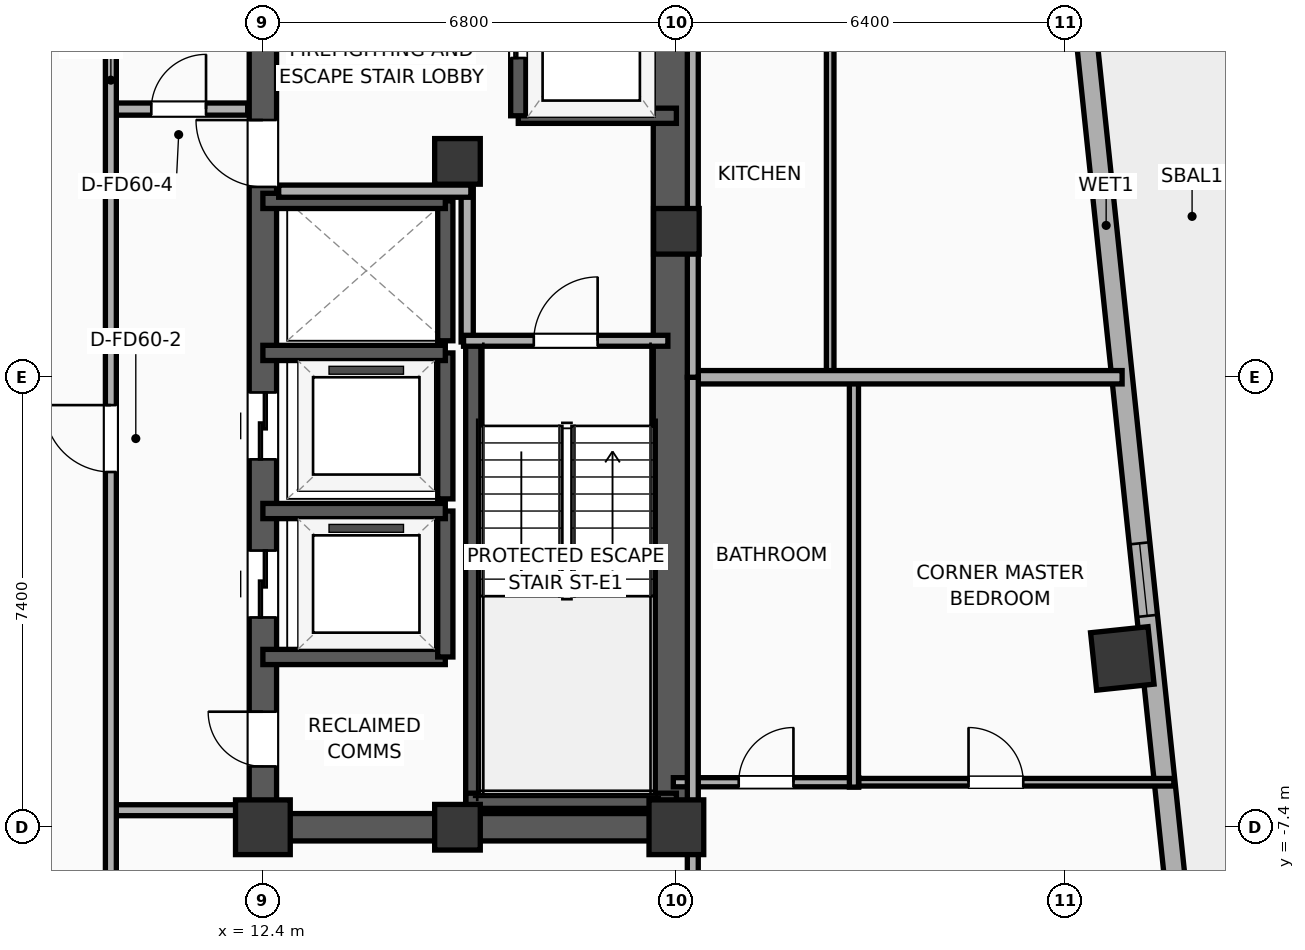
"""IFC4 building model, lengths in metres.
Left out: names, types, materials, properties, quantities, classifications, styles, units other than length and angle.
Written with IfcOpenShell. Run it as: python <this file> out.ifc"""

import sys

from ifc_helpers import new_model, si_unit, direction, frame, frame_2d, origin, origin_2d, place, context, subcontext, project, spatial, rectangle, hollow_rectangle, extrude, element, fill, save


model = new_model("IFC4")
c1 = context("Model", 3, precision=1e-05, world=origin(), true_north=direction((0.0, 1.0)))
c2 = subcontext(c1, "Body", "Model", "MODEL_VIEW")
j1 = project(units=[si_unit("LENGTHUNIT", "METRE"), si_unit("PLANEANGLEUNIT", "RADIAN")], contexts=[c1])
p1 = place(None, origin())
s1 = spatial("IfcSite", under=j1, at=p1, CompositionType="ELEMENT")
p2 = place(p1, origin())
s2 = spatial("IfcBuilding", under=s1, at=p2, CompositionType="ELEMENT")
p3 = place(p2, frame((0.0, 0.0, 171.6)))
s3 = spatial("IfcBuildingStorey", under=s2, at=p3, CompositionType="ELEMENT", Elevation=171.6)
p4 = place(p3, frame((12.4, -7.4, 0.0), z_axis=(0.0, 0.0, 1.0), x_axis=(1.0, 0.0, 0.0)))
e1 = element("IfcColumn", 1, at=p4, inside=s3, PredefinedType="COLUMN", context=c2, shape_type="SweptSolid", body=[
    extrude(rectangle(XDim=0.9, YDim=0.9, at=origin_2d()), origin(), (0.0, 0.0, 1.0), 3.9),
])
for number, where, z_axis, x_axis in (
    (2, (15.6, 3.55, 0.0), (0.0, 0.0, 1.0), (1.0, 0.0, 0.0)),
    (3, (15.6, -7.4, 0.0), (0.0, 0.0, 1.0), (1.0, 0.0, 0.0)),
):
    element("IfcColumn", number, at=place(p3, frame(where, z_axis=z_axis, x_axis=x_axis)), inside=s3, PredefinedType="COLUMN", context=c2, shape_type="SweptSolid", body=[
        extrude(rectangle(XDim=0.75, YDim=0.75, at=origin_2d()), origin(), (0.0, 0.0, 1.0), 3.9),
    ])
p5 = place(p3, frame((19.2, -7.4, 0.0), z_axis=(0.0, 0.0, 1.0), x_axis=(1.0, 0.0, 0.0)))
e4 = element("IfcColumn", 4, at=p5, inside=s3, PredefinedType="COLUMN", context=c2, shape_type="SweptSolid", body=[
    extrude(rectangle(XDim=0.9, YDim=0.9, at=origin_2d()), origin(), (0.0, 0.0, 1.0), 3.9),
])
p6 = place(p3, frame((19.2, 2.4, 0.0), z_axis=(0.0, 0.0, 1.0), x_axis=(1.0, 0.0, 0.0)))
e5 = element("IfcColumn", 5, at=p6, inside=s3, PredefinedType="COLUMN", context=c2, shape_type="SweptSolid", body=[
    extrude(rectangle(XDim=0.75, YDim=0.75, at=origin_2d()), origin(), (0.0, 0.0, 1.0), 3.9),
])
p7 = place(p3, frame((12.175, -7.4, 0.0), z_axis=(0.0, 0.0, 1.0), x_axis=(1.0, 0.0, 0.0)))
e6 = element("IfcWall", 6, at=p7, inside=s3, PredefinedType="SHEAR", context=c2, shape_type="SweptSolid", body=[
    extrude(rectangle(XDim=7.25, YDim=0.45, at=frame_2d((3.625, 0.0))), origin(), (0.0, 0.0, 1.0), 3.65),
])
p8 = place(p3, frame((12.4, -7.4, 0.0), z_axis=(0.0, 0.0, 1.0), x_axis=(0.0, 1.0, 0.0)))
e7 = element("IfcWall", 7, at=p8, inside=s3, PredefinedType="SHEAR", context=c2, shape_type="SweptSolid", body=[
    extrude(rectangle(XDim=14.8, YDim=0.45, at=frame_2d((7.4, 0.0))), origin(), (0.0, 0.0, 1.0), 3.65),
])
p9 = place(p8, frame((3.45, 0.0, 0.0)))
e8 = element("IfcOpeningElement", 8, at=p9, cuts=e7, PredefinedType="OPENING", context=c2, shape_type="SweptSolid", body=[
    extrude(rectangle(XDim=1.1, YDim=2.05, at=frame_2d((0.55, 1.025))), frame((0.0, 0.235, 0.0), z_axis=(0.0, -1.0, 0.0), x_axis=(1.0, 0.0, 0.0)), (0.0, 0.0, 1.0), 0.47),
])
p10 = place(p8, frame((6.05, 0.0, 0.0)))
e9 = element("IfcOpeningElement", 9, at=p10, cuts=e7, PredefinedType="OPENING", context=c2, shape_type="SweptSolid", body=[
    extrude(rectangle(XDim=1.1, YDim=2.05, at=frame_2d((0.55, 1.025))), frame((0.0, 0.235, 0.0), z_axis=(0.0, -1.0, 0.0), x_axis=(1.0, 0.0, 0.0)), (0.0, 0.0, 1.0), 0.47),
])
p11 = place(p8, frame((10.53, 0.0, 0.0)))
e10 = element("IfcOpeningElement", 10, at=p11, cuts=e7, PredefinedType="OPENING", context=c2, shape_type="SweptSolid", body=[
    extrude(rectangle(XDim=1.1, YDim=2.05, at=frame_2d((0.55, 1.025))), frame((0.0, 0.235, 0.0), z_axis=(0.0, -1.0, 0.0), x_axis=(1.0, 0.0, 0.0)), (0.0, 0.0, 1.0), 0.47),
])
p12 = place(p8, frame((1.0, 0.0, 0.0)))
e11 = element("IfcOpeningElement", 11, at=p12, cuts=e7, PredefinedType="OPENING", context=c2, shape_type="SweptSolid", body=[
    extrude(rectangle(XDim=0.9, YDim=2.05, at=frame_2d((0.45, 1.025))), frame((0.0, 0.235, 0.0), z_axis=(0.0, -1.0, 0.0), x_axis=(1.0, 0.0, 0.0)), (0.0, 0.0, 1.0), 0.47),
])
p13 = place(p3, frame((19.145, -7.4, 0.0), z_axis=(0.0, 0.0, 1.0), x_axis=(0.0, 1.0, 0.0)))
e12 = element("IfcWall", 12, at=p13, inside=s3, PredefinedType="SHEAR", context=c2, shape_type="SweptSolid", body=[
    extrude(rectangle(XDim=14.8, YDim=0.65, at=frame_2d((7.4, 0.0))), origin(), (0.0, 0.0, 1.0), 3.65),
])
p14 = place(p3, frame((15.86, -7.085, 0.0), z_axis=(0.0, 0.0, 1.0), x_axis=(0.0, 1.0, 0.0)))
e13 = element("IfcWall", 13, at=p14, inside=s3, PredefinedType="SOLIDWALL", context=c2, shape_type="SweptSolid", body=[
    extrude(rectangle(XDim=7.685, YDim=0.25, at=frame_2d((3.843, 0.0))), origin(), (0.0, 0.0, 1.0), 3.65),
])
p15 = place(p3, frame((15.74, -6.965, 0.0), z_axis=(0.0, 0.0, 1.0), x_axis=(1.0, 0.0, 0.0)))
e14 = element("IfcWall", 14, at=p15, inside=s3, PredefinedType="SOLIDWALL", context=c2, shape_type="SweptSolid", body=[
    extrude(rectangle(XDim=3.46, YDim=0.25, at=frame_2d((1.73, 0.0))), origin(), (0.0, 0.0, 1.0), 3.65),
])
p16 = place(p3, frame((26.533, -4.624, 0.0), z_axis=(0.0, 0.0, 1.0), x_axis=(0.994521895368, 0.104528463268, 0.0)))
e15 = element("IfcColumn", 15, at=p16, inside=s3, PredefinedType="COLUMN", context=c2, shape_type="SweptSolid", body=[
    extrude(hollow_rectangle(XDim=0.95, YDim=0.95, WallThickness=0.032, at=origin_2d()), origin(), (0.0, 0.0, 1.0), 3.9),
])
p17 = place(p3, frame((24.534, 18.99, 0.0), z_axis=(0.0, 0.0, 1.0), x_axis=(0.104534959766, -0.994521212537, 0.0)))
e16 = element("IfcWall", 16, at=p17, inside=s3, PredefinedType="ELEMENTEDWALL", context=c2, shape_type="SweptSolid", body=[
    extrude(rectangle(XDim=33.166, YDim=0.34, at=frame_2d((16.583, 0.0))), origin(), (0.0, 0.0, 1.0), 3.65),
])
p18 = place(p17, frame((6.542, 0.0, 0.75)))
e17 = element("IfcOpeningElement", 17, at=p18, cuts=e16, PredefinedType="OPENING", context=c2, shape_type="SweptSolid", body=[
    extrude(rectangle(XDim=1.8, YDim=2.1, at=frame_2d((0.9, 1.05))), frame((0.0, 0.18, 0.0), z_axis=(0.0, -1.0, 0.0), x_axis=(1.0, 0.0, 0.0)), (0.0, 0.0, 1.0), 0.36),
])
p19 = place(p17, frame((21.84, 0.0, 0.75)))
e18 = element("IfcOpeningElement", 18, at=p19, cuts=e16, PredefinedType="OPENING", context=c2, shape_type="SweptSolid", body=[
    extrude(rectangle(XDim=1.2, YDim=2.05, at=frame_2d((0.6, 1.025))), frame((0.0, 0.18, 0.0), z_axis=(0.0, -1.0, 0.0), x_axis=(1.0, 0.0, 0.0)), (0.0, 0.0, 1.0), 0.36),
])
p20 = place(p3, frame((16.6, 4.3, 0.0), z_axis=(0.0, 0.0, 1.0), x_axis=(1.0, 0.0, 0.0)))
e19 = element("IfcWall", 19, at=p20, inside=s3, PredefinedType="SOLIDWALL", context=c2, shape_type="SweptSolid", body=[
    extrude(rectangle(XDim=2.6, YDim=0.25, at=frame_2d((1.3, 0.0))), origin(), (0.0, 0.0, 1.0), 3.65),
])
p21 = place(p3, frame((16.6, 7.4, 0.0), z_axis=(0.0, 0.0, 1.0), x_axis=(0.0, -1.0, 0.0)))
e20 = element("IfcWall", 20, at=p21, inside=s3, PredefinedType="SOLIDWALL", context=c2, shape_type="SweptSolid", body=[
    extrude(rectangle(XDim=3.1, YDim=0.25, at=frame_2d((1.55, 0.0))), origin(), (0.0, 0.0, 1.0), 3.65),
])
p22 = place(p21, frame((0.95, 0.0, 0.0)))
e21 = element("IfcOpeningElement", 21, at=p22, cuts=e20, PredefinedType="OPENING", context=c2, shape_type="SweptSolid", body=[
    extrude(rectangle(XDim=1.2, YDim=2.05, at=frame_2d((0.6, 1.025))), frame((0.0, 0.135, 0.0), z_axis=(0.0, -1.0, 0.0), x_axis=(1.0, 0.0, 0.0)), (0.0, 0.0, 1.0), 0.27),
])
p23 = place(p3, frame((12.4, -4.6, 0.0), z_axis=(0.0, 0.0, 1.0), x_axis=(1.0, 0.0, 0.0)))
e22 = element("IfcWall", 22, at=p23, inside=s3, PredefinedType="SOLIDWALL", context=c2, shape_type="SweptSolid", body=[
    extrude(rectangle(XDim=3.0, YDim=0.25, at=frame_2d((1.5, 0.0))), origin(), (0.0, 0.0, 1.0), 3.65),
])
p24 = place(p3, frame((15.4, -4.6, 0.0), z_axis=(0.0, 0.0, 1.0), x_axis=(0.0, 1.0, 0.0)))
e23 = element("IfcWall", 23, at=p24, inside=s3, PredefinedType="SOLIDWALL", context=c2, shape_type="SweptSolid", body=[
    extrude(rectangle(XDim=2.4, YDim=0.25, at=frame_2d((1.2, 0.0))), origin(), (0.0, 0.0, 1.0), 3.65),
])
p25 = place(p3, frame((15.4, -2.2, 0.0), z_axis=(0.0, 0.0, 1.0), x_axis=(-1.0, 0.0, 0.0)))
e24 = element("IfcWall", 24, at=p25, inside=s3, PredefinedType="SOLIDWALL", context=c2, shape_type="SweptSolid", body=[
    extrude(rectangle(XDim=3.0, YDim=0.25, at=frame_2d((1.5, 0.0))), origin(), (0.0, 0.0, 1.0), 3.65),
])
p26 = place(p3, frame((15.4, -2.0, 0.0), z_axis=(0.0, 0.0, 1.0), x_axis=(0.0, 1.0, 0.0)))
e25 = element("IfcWall", 25, at=p26, inside=s3, PredefinedType="SOLIDWALL", context=c2, shape_type="SweptSolid", body=[
    extrude(rectangle(XDim=2.4, YDim=0.25, at=frame_2d((1.2, 0.0))), origin(), (0.0, 0.0, 1.0), 3.65),
])
p27 = place(p3, frame((15.4, 0.4, 0.0), z_axis=(0.0, 0.0, 1.0), x_axis=(-1.0, 0.0, 0.0)))
e26 = element("IfcWall", 26, at=p27, inside=s3, PredefinedType="SOLIDWALL", context=c2, shape_type="SweptSolid", body=[
    extrude(rectangle(XDim=3.0, YDim=0.25, at=frame_2d((1.5, 0.0))), origin(), (0.0, 0.0, 1.0), 3.65),
])
p28 = place(p3, frame((15.4, 0.6, 0.0), z_axis=(0.0, 0.0, 1.0), x_axis=(0.0, 1.0, 0.0)))
e27 = element("IfcWall", 27, at=p28, inside=s3, PredefinedType="SOLIDWALL", context=c2, shape_type="SweptSolid", body=[
    extrude(rectangle(XDim=2.3, YDim=0.25, at=frame_2d((1.15, 0.0))), origin(), (0.0, 0.0, 1.0), 3.65),
])
p29 = place(p3, frame((15.4, 2.9, 0.0), z_axis=(0.0, 0.0, 1.0), x_axis=(-1.0, 0.0, 0.0)))
e28 = element("IfcWall", 28, at=p29, inside=s3, PredefinedType="SOLIDWALL", context=c2, shape_type="SweptSolid", body=[
    extrude(rectangle(XDim=3.0, YDim=0.25, at=frame_2d((1.5, 0.0))), origin(), (0.0, 0.0, 1.0), 3.65),
])
p30 = place(p3, frame((15.76, 0.58, 0.0), z_axis=(0.0, 0.0, 1.0), x_axis=(0.0, 1.0, 0.0)))
e29 = element("IfcWall", 29, at=p30, inside=s3, PredefinedType="PARTITIONING", context=c2, shape_type="SweptSolid", body=[
    extrude(rectangle(XDim=2.52, YDim=0.2, at=frame_2d((1.26, 0.0))), origin(), (0.0, 0.0, 1.0), 3.65),
])
p31 = place(p3, frame((12.66, 3.06, 0.0), z_axis=(0.0, 0.0, 1.0), x_axis=(1.0, 0.0, 0.0)))
e30 = element("IfcWall", 30, at=p31, inside=s3, PredefinedType="PARTITIONING", context=c2, shape_type="SweptSolid", body=[
    extrude(rectangle(XDim=3.16, YDim=0.2, at=frame_2d((1.58, 0.0))), origin(), (0.0, 0.0, 1.0), 3.65),
])
p32 = place(p3, frame((15.7, 0.6, 0.0), z_axis=(0.0, 0.0, 1.0), x_axis=(1.0, 0.0, 0.0)))
e31 = element("IfcWall", 31, at=p32, inside=s3, PredefinedType="PARTITIONING", context=c2, shape_type="SweptSolid", body=[
    extrude(rectangle(XDim=3.36, YDim=0.18, at=frame_2d((1.68, 0.0))), origin(), (0.0, 0.0, 1.0), 3.65),
])
p33 = place(p32, frame((1.155, 0.0, 0.0)))
e32 = element("IfcOpeningElement", 32, at=p33, cuts=e31, PredefinedType="OPENING", context=c2, shape_type="SweptSolid", body=[
    extrude(rectangle(XDim=1.05, YDim=2.05, at=frame_2d((0.525, 1.025))), frame((0.0, 0.1, 0.0), z_axis=(0.0, -1.0, 0.0), x_axis=(1.0, 0.0, 0.0)), (0.0, 0.0, 1.0), 0.2),
])
p34 = place(p3, frame((9.88, 4.41, 0.0), z_axis=(0.0, 0.0, 1.0), x_axis=(1.0, 0.0, 0.0)))
e33 = element("IfcWall", 33, at=p34, inside=s3, PredefinedType="PARTITIONING", context=c2, shape_type="SweptSolid", body=[
    extrude(rectangle(XDim=2.27, YDim=0.2, at=frame_2d((1.135, 0.0))), origin(), (0.0, 0.0, 1.0), 3.65),
])
p35 = place(p34, frame((0.685, 0.0, 0.0)))
e34 = element("IfcOpeningElement", 34, at=p35, cuts=e33, PredefinedType="OPENING", context=c2, shape_type="SweptSolid", body=[
    extrude(rectangle(XDim=0.9, YDim=2.05, at=frame_2d((0.45, 1.025))), frame((0.0, 0.11, 0.0), z_axis=(0.0, -1.0, 0.0), x_axis=(1.0, 0.0, 0.0)), (0.0, 0.0, 1.0), 0.22),
])
p36 = place(p3, frame((9.88, -7.12, 0.0), z_axis=(0.0, 0.0, 1.0), x_axis=(1.0, 0.0, 0.0)))
e35 = element("IfcWall", 35, at=p36, inside=s3, PredefinedType="PARTITIONING", context=c2, shape_type="SweptSolid", body=[
    extrude(rectangle(XDim=2.27, YDim=0.18, at=frame_2d((1.135, 0.0))), origin(), (0.0, 0.0, 1.0), 3.65),
])
p37 = place(p3, frame((9.9, -10.08, 0.0), z_axis=(0.0, 0.0, 1.0), x_axis=(0.0, 1.0, 0.0)))
e36 = element("IfcWall", 36, at=p37, inside=s3, PredefinedType="PARTITIONING", context=c2, shape_type="SweptSolid", body=[
    extrude(rectangle(XDim=20.16, YDim=0.18, at=frame_2d((10.08, 0.0))), origin(), (0.0, 0.0, 1.0), 3.65),
])
p38 = place(p37, frame((8.522, 0.0, 0.0)))
e37 = element("IfcOpeningElement", 37, at=p38, cuts=e36, PredefinedType="OPENING", context=c2, shape_type="SweptSolid", body=[
    extrude(rectangle(XDim=1.1, YDim=2.05, at=frame_2d((0.55, 1.025))), frame((0.0, 0.1, 0.0), z_axis=(0.0, -1.0, 0.0), x_axis=(1.0, 0.0, 0.0)), (0.0, 0.0, 1.0), 0.2),
])
p39 = place(p3, frame((22.06, -6.66, 0.0), z_axis=(0.0, 0.0, 1.0), x_axis=(1.0, 0.0, 0.0)))
e38 = element("IfcWall", 38, at=p39, inside=s3, PredefinedType="PARTITIONING", context=c2, shape_type="SweptSolid", body=[
    extrude(rectangle(XDim=5.321, YDim=0.125, at=frame_2d((2.661, 0.0))), origin(), (0.0, 0.0, 1.0), 3.65),
])
p40 = place(p39, frame((1.945, 0.0, 0.0)))
e39 = element("IfcOpeningElement", 39, at=p40, cuts=e38, PredefinedType="OPENING", context=c2, shape_type="SweptSolid", body=[
    extrude(rectangle(XDim=0.9, YDim=2.05, at=frame_2d((0.45, 1.025))), frame((0.0, 0.073, 0.0), z_axis=(0.0, -1.0, 0.0), x_axis=(1.0, 0.0, 0.0)), (0.0, 0.0, 1.0), 0.145),
])
p41 = place(p3, frame((19.15, -6.66, 0.0), z_axis=(0.0, 0.0, 1.0), x_axis=(1.0, 0.0, 0.0)))
e40 = element("IfcWall", 40, at=p41, inside=s3, PredefinedType="PLUMBINGWALL", context=c2, shape_type="SweptSolid", body=[
    extrude(rectangle(XDim=3.05, YDim=0.15, at=frame_2d((1.525, 0.0))), origin(), (0.0, 0.0, 1.0), 3.04),
])
p42 = place(p41, frame((1.075, 0.0, 0.0)))
e41 = element("IfcOpeningElement", 41, at=p42, cuts=e40, PredefinedType="OPENING", context=c2, shape_type="SweptSolid", body=[
    extrude(rectangle(XDim=0.9, YDim=2.05, at=frame_2d((0.45, 1.025))), frame((0.0, 0.085, 0.0), z_axis=(0.0, -1.0, 0.0), x_axis=(1.0, 0.0, 0.0)), (0.0, 0.0, 1.0), 0.17),
])
p43 = place(p3, frame((22.12, -6.74, 0.0), z_axis=(0.0, 0.0, 1.0), x_axis=(0.0, 1.0, 0.0)))
e42 = element("IfcWall", 42, at=p43, inside=s3, PredefinedType="PLUMBINGWALL", context=c2, shape_type="SweptSolid", body=[
    extrude(rectangle(XDim=6.72, YDim=0.15, at=frame_2d((3.36, 0.0))), origin(), (0.0, 0.0, 1.0), 3.65),
])
p44 = place(p3, frame((21.729, 0.02, 0.0), z_axis=(0.0, 0.0, 1.0), x_axis=(0.0, 1.0, 0.0)))
e43 = element("IfcWall", 43, at=p44, inside=s3, PredefinedType="PARTITIONING", context=c2, shape_type="SweptSolid", body=[
    extrude(rectangle(XDim=6.72, YDim=0.125, at=frame_2d((3.36, 0.0))), origin(), (0.0, 0.0, 1.0), 3.65),
])
p45 = place(p3, frame((19.47, 0.0, 0.0), z_axis=(0.0, 0.0, 1.0), x_axis=(1.0, 0.0, 0.0)))
e44 = element("IfcWall", 44, at=p45, inside=s3, PredefinedType="PARTITIONING", context=c2, shape_type="SweptSolid", body=[
    extrude(rectangle(XDim=7.06, YDim=0.22, at=frame_2d((3.53, 0.0))), origin(), (0.0, 0.0, 1.0), 3.65),
])
p46 = place(p3, frame((19.47, -18.559, 0.0), z_axis=(0.0, 0.0, 1.0), x_axis=(0.0, 1.0, 0.0)))
e45 = element("IfcWall", 45, at=p46, inside=s3, PredefinedType="PARTITIONING", context=c2, shape_type="SweptSolid", body=[
    extrude(rectangle(XDim=18.559, YDim=0.18, at=frame_2d((9.279, 0.0))), origin(), (0.0, 0.0, 1.0), 3.65),
])
p47 = place(p46, frame((7.378, 0.0, 0.0)))
e46 = element("IfcOpeningElement", 46, at=p47, cuts=e45, PredefinedType="OPENING", context=c2, shape_type="SweptSolid", body=[
    extrude(rectangle(XDim=0.9, YDim=2.05, at=frame_2d((0.45, 1.025))), frame((0.0, 0.1, 0.0), z_axis=(0.0, -1.0, 0.0), x_axis=(1.0, 0.0, 0.0)), (0.0, 0.0, 1.0), 0.2),
])
p48 = place(p3, frame((19.47, 0.0, 0.0), z_axis=(0.0, 0.0, 1.0), x_axis=(0.0, 1.0, 0.0)))
e47 = element("IfcWall", 47, at=p48, inside=s3, PredefinedType="PARTITIONING", context=c2, shape_type="SweptSolid", body=[
    extrude(rectangle(XDim=22.124, YDim=0.18, at=frame_2d((11.062, 0.0))), origin(), (0.0, 0.0, 1.0), 3.04),
])
p49 = place(p48, frame((10.28, 0.0, 0.0)))
e48 = element("IfcOpeningElement", 48, at=p49, cuts=e47, PredefinedType="OPENING", context=c2, shape_type="SweptSolid", body=[
    extrude(rectangle(XDim=0.9, YDim=2.05, at=frame_2d((0.45, 1.025))), frame((0.0, 0.1, 0.0), z_axis=(0.0, -1.0, 0.0), x_axis=(1.0, 0.0, 0.0)), (0.0, 0.0, 1.0), 0.2),
])
p50 = place(p19, origin())
e49 = element("IfcWindow", 49, at=p50, inside=s3, PartitioningType="SINGLE_PANEL", PredefinedType="WINDOW", context=c2, shape_type="SweptSolid", body=[
    extrude(rectangle(XDim=1.2, YDim=2.05, at=frame_2d((0.6, 1.025))), frame((0.0, 0.03, 0.0), z_axis=(0.0, -1.0, 0.0), x_axis=(1.0, 0.0, 0.0)), (0.0, 0.0, 1.0), 0.06),
])
fill(e18, e49)
p51 = place(p22, origin())
e50 = element("IfcDoor", 50, at=p51, inside=s3, OperationType="SLIDING_TO_LEFT", PredefinedType="DOOR", context=c2, shape_type="SweptSolid", body=[
    extrude(rectangle(XDim=1.2, YDim=2.05, at=frame_2d((0.6, 1.025))), frame((0.0, 0.025, 0.0), z_axis=(0.0, -1.0, 0.0), x_axis=(1.0, 0.0, 0.0)), (0.0, 0.0, 1.0), 0.05),
])
fill(e21, e50)
p52 = place(p9, origin())
e51 = element("IfcDoor", 51, at=p52, inside=s3, OperationType="SLIDING_TO_LEFT", PredefinedType="DOOR", context=c2, shape_type="SweptSolid", body=[
    extrude(rectangle(XDim=1.1, YDim=2.05, at=frame_2d((0.55, 1.025))), frame((0.0, 0.025, 0.0), z_axis=(0.0, -1.0, 0.0), x_axis=(1.0, 0.0, 0.0)), (0.0, 0.0, 1.0), 0.05),
])
fill(e8, e51)
p53 = place(p10, origin())
e52 = element("IfcDoor", 52, at=p53, inside=s3, OperationType="SLIDING_TO_LEFT", PredefinedType="DOOR", context=c2, shape_type="SweptSolid", body=[
    extrude(rectangle(XDim=1.1, YDim=2.05, at=frame_2d((0.55, 1.025))), frame((0.0, 0.025, 0.0), z_axis=(0.0, -1.0, 0.0), x_axis=(1.0, 0.0, 0.0)), (0.0, 0.0, 1.0), 0.05),
])
fill(e9, e52)
p54 = place(p33, origin())
e53 = element("IfcDoor", 53, at=p54, inside=s3, OperationType="SINGLE_SWING_RIGHT", PredefinedType="DOOR", context=c2, shape_type="SweptSolid", body=[
    extrude(rectangle(XDim=1.05, YDim=2.05, at=frame_2d((0.525, 1.025))), frame((0.0, 0.025, 0.0), z_axis=(0.0, -1.0, 0.0), x_axis=(1.0, 0.0, 0.0)), (0.0, 0.0, 1.0), 0.05),
])
fill(e32, e53)
p55 = place(p35, origin())
e54 = element("IfcDoor", 54, at=p55, inside=s3, OperationType="SINGLE_SWING_RIGHT", PredefinedType="DOOR", context=c2, shape_type="SweptSolid", body=[
    extrude(rectangle(XDim=0.9, YDim=2.05, at=frame_2d((0.45, 1.025))), frame((0.0, 0.025, 0.0), z_axis=(0.0, -1.0, 0.0), x_axis=(1.0, 0.0, 0.0)), (0.0, 0.0, 1.0), 0.05),
])
fill(e34, e54)
p56 = place(p38, origin())
e55 = element("IfcDoor", 55, at=p56, inside=s3, OperationType="SINGLE_SWING_RIGHT", PredefinedType="DOOR", context=c2, shape_type="SweptSolid", body=[
    extrude(rectangle(XDim=1.1, YDim=2.05, at=frame_2d((0.55, 1.025))), frame((0.0, 0.025, 0.0), z_axis=(0.0, -1.0, 0.0), x_axis=(1.0, 0.0, 0.0)), (0.0, 0.0, 1.0), 0.05),
])
fill(e37, e55)
p57 = place(p40, origin())
e56 = element("IfcDoor", 56, at=p57, inside=s3, OperationType="SINGLE_SWING_LEFT", PredefinedType="DOOR", context=c2, shape_type="SweptSolid", body=[
    extrude(rectangle(XDim=0.9, YDim=2.05, at=frame_2d((0.45, 1.025))), frame((0.0, 0.025, 0.0), z_axis=(0.0, -1.0, 0.0), x_axis=(1.0, 0.0, 0.0)), (0.0, 0.0, 1.0), 0.05),
])
fill(e39, e56)
p58 = place(p42, origin())
e57 = element("IfcDoor", 57, at=p58, inside=s3, OperationType="SINGLE_SWING_RIGHT", PredefinedType="DOOR", context=c2, shape_type="SweptSolid", body=[
    extrude(rectangle(XDim=0.9, YDim=2.05, at=frame_2d((0.45, 1.025))), frame((0.0, 0.025, 0.0), z_axis=(0.0, -1.0, 0.0), x_axis=(1.0, 0.0, 0.0)), (0.0, 0.0, 1.0), 0.05),
])
fill(e41, e57)
p59 = place(p11, origin())
e58 = element("IfcDoor", 58, at=p59, inside=s3, OperationType="SINGLE_SWING_RIGHT", PredefinedType="DOOR", context=c2, shape_type="SweptSolid", body=[
    extrude(rectangle(XDim=1.1, YDim=2.05, at=frame_2d((0.55, 1.025))), frame((0.0, 0.025, 0.0), z_axis=(0.0, -1.0, 0.0), x_axis=(1.0, 0.0, 0.0)), (0.0, 0.0, 1.0), 0.05),
])
fill(e10, e58)
p60 = place(p12, origin())
e59 = element("IfcDoor", 59, at=p60, inside=s3, OperationType="SINGLE_SWING_RIGHT", PredefinedType="DOOR", context=c2, shape_type="SweptSolid", body=[
    extrude(rectangle(XDim=0.9, YDim=2.05, at=frame_2d((0.45, 1.025))), frame((0.0, 0.025, 0.0), z_axis=(0.0, -1.0, 0.0), x_axis=(1.0, 0.0, 0.0)), (0.0, 0.0, 1.0), 0.05),
])
fill(e11, e59)
save(model, sys.argv[1])
